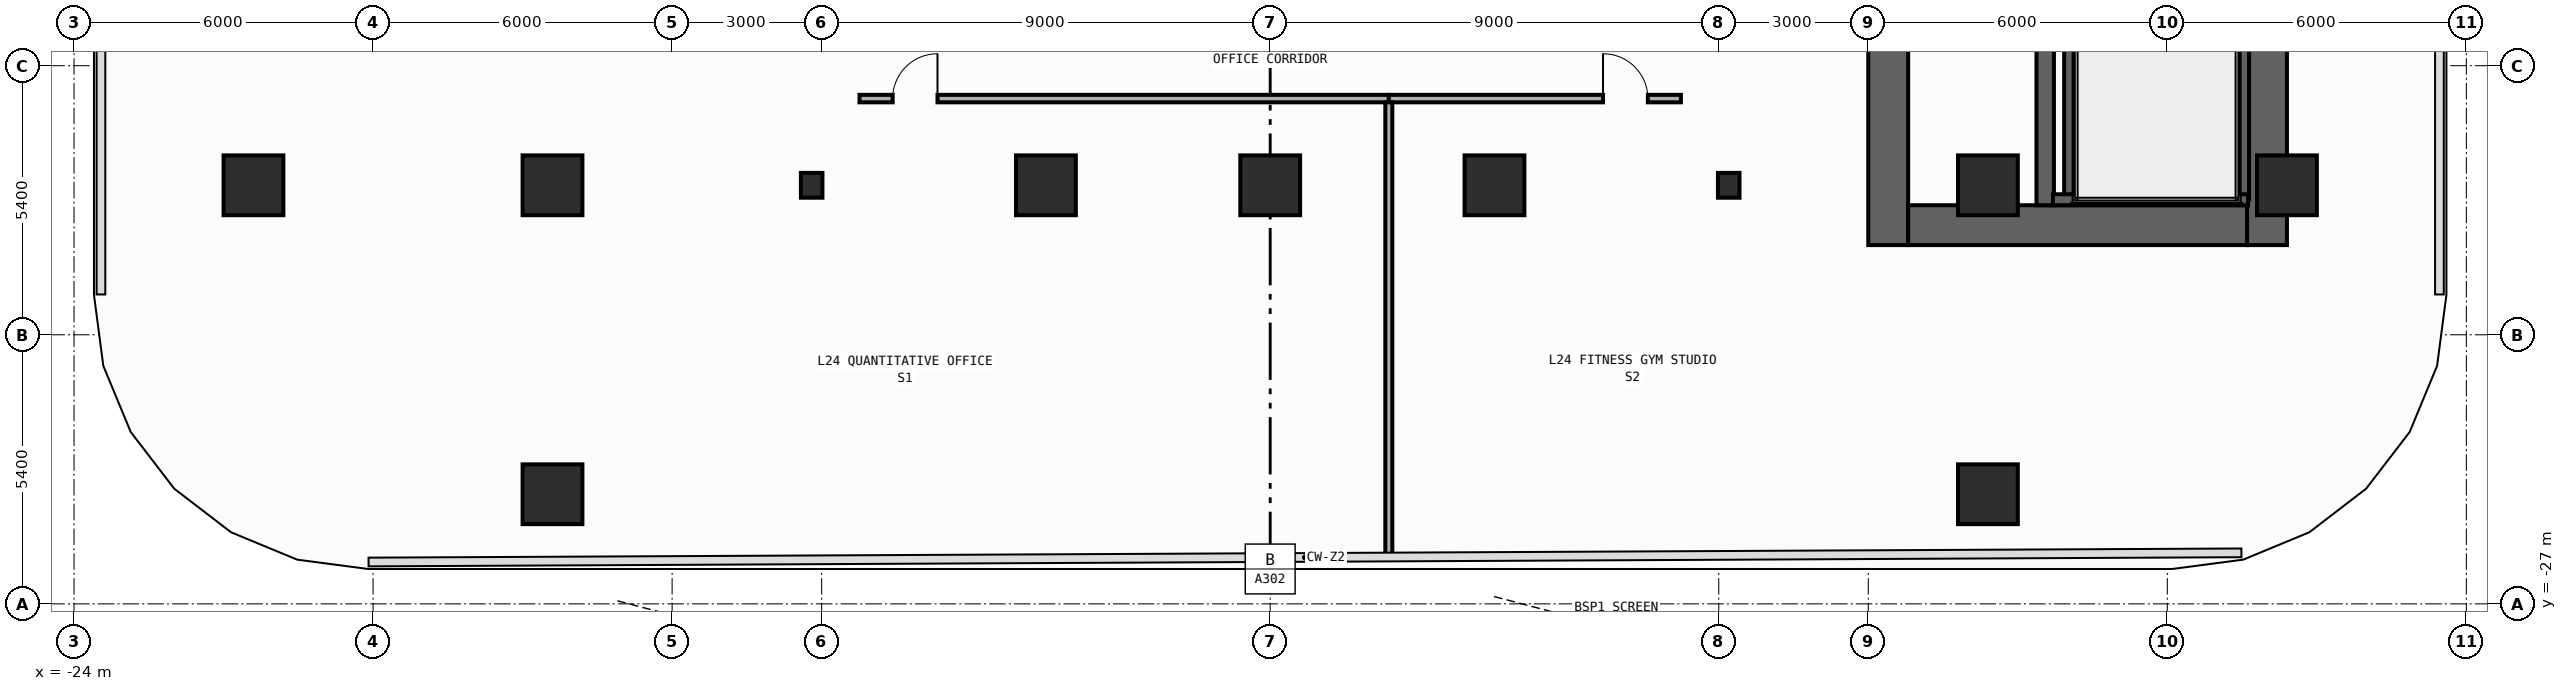
"""IFC4 building model, lengths in metres.
Left out: names, types, materials, properties, quantities, classifications, styles, units other than length and angle.
Written with IfcOpenShell. Run it as: python <this file> out.ifc"""

import sys

from ifc_helpers import new_model, si_unit, direction, frame, frame_2d, origin, origin_2d, place, context, subcontext, project, spatial, rectangle, i_section, extrude, element, fill, save


model = new_model("IFC4")
c1 = context("Model", 3, precision=1e-05, world=origin(), true_north=direction((0.0, 1.0)))
c2 = subcontext(c1, "Body", "Model", "MODEL_VIEW")
j1 = project(units=[si_unit("LENGTHUNIT", "METRE"), si_unit("PLANEANGLEUNIT", "RADIAN")], contexts=[c1])
p1 = place(None, origin())
s1 = spatial("IfcSite", under=j1, at=p1, CompositionType="ELEMENT")
p2 = place(p1, origin())
s2 = spatial("IfcBuilding", under=s1, at=p2, CompositionType="ELEMENT")
p3 = place(p2, frame((0.0, 0.0, 105.8)))
s3 = spatial("IfcBuildingStorey", under=s2, at=p3, CompositionType="ELEMENT", Elevation=105.8)
p4 = place(p3, frame((12.4, -19.8, 0.0), z_axis=(0.0, 0.0, 1.0), x_axis=(0.0, 1.0, 0.0)))
e1 = element("IfcWall", 1, at=p4, inside=s3, PredefinedType="SHEAR", context=c2, shape_type="SweptSolid", body=[
    extrude(rectangle(XDim=27.0, YDim=0.8, at=frame_2d((13.5, 0.0))), origin(), (0.0, 0.0, 1.0), 3.94),
])
p5 = place(p4, frame((23.05, 0.0, 0.0)))
e2 = element("IfcOpeningElement", 2, at=p5, cuts=e1, PredefinedType="OPENING", context=c2, shape_type="SweptSolid", body=[
    extrude(rectangle(XDim=1.1, YDim=2.2, at=frame_2d((0.55, 1.1))), frame((0.0, 0.41, 0.0), z_axis=(0.0, -1.0, 0.0), x_axis=(1.0, 0.0, 0.0)), (0.0, 0.0, 1.0), 0.82),
])
p6 = place(p4, frame((19.85, 0.0, 0.0)))
e3 = element("IfcOpeningElement", 3, at=p6, cuts=e1, PredefinedType="OPENING", context=c2, shape_type="SweptSolid", body=[
    extrude(rectangle(XDim=1.1, YDim=2.2, at=frame_2d((0.55, 1.1))), frame((0.0, 0.41, 0.0), z_axis=(0.0, -1.0, 0.0), x_axis=(1.0, 0.0, 0.0)), (0.0, 0.0, 1.0), 0.82),
])
p7 = place(p4, frame((16.65, 0.0, 0.0)))
e4 = element("IfcOpeningElement", 4, at=p7, cuts=e1, PredefinedType="OPENING", context=c2, shape_type="SweptSolid", body=[
    extrude(rectangle(XDim=1.1, YDim=2.2, at=frame_2d((0.55, 1.1))), frame((0.0, 0.41, 0.0), z_axis=(0.0, -1.0, 0.0), x_axis=(1.0, 0.0, 0.0)), (0.0, 0.0, 1.0), 0.82),
])
p8 = place(p4, frame((7.175, 0.0, 0.0)))
e5 = element("IfcOpeningElement", 5, at=p8, cuts=e1, PredefinedType="OPENING", context=c2, shape_type="SweptSolid", body=[
    extrude(rectangle(XDim=0.85, YDim=2.1, at=frame_2d((0.425, 1.05))), frame((0.0, 0.41, 0.0), z_axis=(0.0, -1.0, 0.0), x_axis=(1.0, 0.0, 0.0)), (0.0, 0.0, 1.0), 0.82),
])
p9 = place(p4, frame((10.375, 0.0, 0.0)))
e6 = element("IfcOpeningElement", 6, at=p9, cuts=e1, PredefinedType="OPENING", context=c2, shape_type="SweptSolid", body=[
    extrude(rectangle(XDim=0.85, YDim=2.1, at=frame_2d((0.425, 1.05))), frame((0.0, 0.41, 0.0), z_axis=(0.0, -1.0, 0.0), x_axis=(1.0, 0.0, 0.0)), (0.0, 0.0, 1.0), 0.82),
])
p10 = place(p4, frame((12.725, 0.0, 0.0)))
e7 = element("IfcOpeningElement", 7, at=p10, cuts=e1, PredefinedType="OPENING", context=c2, shape_type="SweptSolid", body=[
    extrude(rectangle(XDim=1.15, YDim=2.2, at=frame_2d((0.575, 1.1))), frame((0.0, 0.41, 0.0), z_axis=(0.0, -1.0, 0.0), x_axis=(1.0, 0.0, 0.0)), (0.0, 0.0, 1.0), 0.82),
])
p11 = place(p4, frame((25.125, 0.0, 0.0)))
e8 = element("IfcOpeningElement", 8, at=p11, cuts=e1, PredefinedType="OPENING", context=c2, shape_type="SweptSolid", body=[
    extrude(rectangle(XDim=0.85, YDim=2.1, at=frame_2d((0.425, 1.05))), frame((0.0, 0.41, 0.0), z_axis=(0.0, -1.0, 0.0), x_axis=(1.0, 0.0, 0.0)), (0.0, 0.0, 1.0), 0.82),
])
p12 = place(p3, frame((20.0, -19.8, 0.0), z_axis=(0.0, 0.0, 1.0), x_axis=(0.0, 1.0, 0.0)))
e9 = element("IfcWall", 9, at=p12, inside=s3, PredefinedType="SHEAR", context=c2, shape_type="SweptSolid", body=[
    extrude(rectangle(XDim=27.0, YDim=0.8, at=frame_2d((13.5, 0.0))), origin(), (0.0, 0.0, 1.0), 3.94),
])
p13 = place(p3, frame((12.8, -19.4, 0.0), z_axis=(0.0, 0.0, 1.0), x_axis=(1.0, 0.0, 0.0)))
e10 = element("IfcWall", 10, at=p13, inside=s3, PredefinedType="SHEAR", context=c2, shape_type="SweptSolid", body=[
    extrude(rectangle(XDim=6.8, YDim=0.8, at=frame_2d((3.4, 0.0))), origin(), (0.0, 0.0, 1.0), 3.94),
])
p14 = place(p3, frame((15.55, -19.0, 0.0), z_axis=(0.0, 0.0, 1.0), x_axis=(0.0, 1.0, 0.0)))
e11 = element("IfcWall", 11, at=p14, inside=s3, PredefinedType="SHEAR", context=c2, shape_type="SweptSolid", body=[
    extrude(rectangle(XDim=25.4, YDim=0.35, at=frame_2d((12.7, 0.0))), origin(), (0.0, 0.0, 1.0), 3.94),
])
p15 = place(p14, frame((11.925, 0.0, 0.0)))
e12 = element("IfcOpeningElement", 12, at=p15, cuts=e11, PredefinedType="OPENING", context=c2, shape_type="SweptSolid", body=[
    extrude(rectangle(XDim=1.15, YDim=2.2, at=frame_2d((0.575, 1.1))), frame((0.0, 0.185, 0.0), z_axis=(0.0, -1.0, 0.0), x_axis=(1.0, 0.0, 0.0)), (0.0, 0.0, 1.0), 0.37),
])
p16 = place(p14, frame((24.325, 0.0, 0.0)))
e13 = element("IfcOpeningElement", 13, at=p16, cuts=e11, PredefinedType="OPENING", context=c2, shape_type="SweptSolid", body=[
    extrude(rectangle(XDim=0.85, YDim=2.1, at=frame_2d((0.425, 1.05))), frame((0.0, 0.185, 0.0), z_axis=(0.0, -1.0, 0.0), x_axis=(1.0, 0.0, 0.0)), (0.0, 0.0, 1.0), 0.37),
])
for number, where, z_axis, x_axis in (
    (14, (16.04, -18.89, 0.0), (0.0, 0.0, 1.0), (0.0, 1.0, 0.0)),
    (15, (19.53, -18.89, 0.0), (0.0, 0.0, 1.0), (0.0, 1.0, 0.0)),
):
    element("IfcWall", number, at=place(p3, frame(where, z_axis=z_axis, x_axis=x_axis)), inside=s3, PredefinedType="SHEAR", context=c2, shape_type="SweptSolid", body=[
        extrude(rectangle(XDim=11.3, YDim=0.22, at=frame_2d((5.65, 0.0))), origin(), (0.0, 0.0, 1.0), 3.94),
    ])
p17 = place(p3, frame((15.705, -18.89, 0.0), z_axis=(0.0, 0.0, 1.0), x_axis=(1.0, 0.0, 0.0)))
e16 = element("IfcWall", 16, at=p17, inside=s3, PredefinedType="SHEAR", context=c2, shape_type="SweptSolid", body=[
    extrude(rectangle(XDim=3.915, YDim=0.22, at=frame_2d((1.958, 0.0))), origin(), (0.0, 0.0, 1.0), 3.94),
])
for number, where, z_axis, x_axis in (
    (17, (-9.2, -18.6, 0.0), (0.0, 0.0, 1.0), (1.0, 0.0, 0.0)),
    (18, (9.2, -18.6, 0.0), (0.0, 0.0, 1.0), (1.0, 0.0, 0.0)),
):
    element("IfcColumn", number, at=place(p3, frame(where, z_axis=z_axis, x_axis=x_axis)), inside=s3, PredefinedType="COLUMN", context=c2, shape_type="SweptSolid", body=[
        extrude(i_section(OverallWidth=0.432, OverallDepth=0.498, WebThickness=0.045, FlangeThickness=0.07, FilletRadius=0.022, at=origin_2d()), origin(), (0.0, 0.0, 1.0), 4.2),
    ])
for number, where, z_axis, x_axis in (
    (19, (-20.4, -18.6, 0.0), (0.0, 0.0, 1.0), (1.0, 0.0, 0.0)),
    (20, (20.4, -18.6, 0.0), (0.0, 0.0, 1.0), (1.0, 0.0, 0.0)),
    (21, (-14.4, -18.6, 0.0), (0.0, 0.0, 1.0), (1.0, 0.0, 0.0)),
    (22, (14.4, -18.6, 0.0), (0.0, 0.0, 1.0), (1.0, 0.0, 0.0)),
    (23, (-4.5, -18.6, 0.0), (0.0, 0.0, 1.0), (1.0, 0.0, 0.0)),
    (24, (0.0, -18.6, 0.0), (0.0, 0.0, 1.0), (1.0, 0.0, 0.0)),
    (25, (4.5, -18.6, 0.0), (0.0, 0.0, 1.0), (1.0, 0.0, 0.0)),
    (26, (-14.4, -24.8, 0.0), (0.0, 0.0, 1.0), (1.0, 0.0, 0.0)),
    (27, (14.4, -24.8, 0.0), (0.0, 0.0, 1.0), (1.0, 0.0, 0.0)),
):
    element("IfcColumn", number, at=place(p3, frame(where, z_axis=z_axis, x_axis=x_axis)), inside=s3, PredefinedType="COLUMN", context=c2, shape_type="SweptSolid", body=[
        extrude(rectangle(XDim=1.2, YDim=1.2, at=origin_2d()), origin(), (0.0, 0.0, 1.0), 4.2),
    ])
p18 = place(p3, frame((-8.24, -16.86, 0.0), z_axis=(0.0, 0.0, 1.0), x_axis=(1.0, 0.0, 0.0)))
e28 = element("IfcWall", 28, at=p18, inside=s3, PredefinedType="PARTITIONING", context=c2, shape_type="SweptSolid", body=[
    extrude(rectangle(XDim=10.62, YDim=0.15, at=frame_2d((5.31, 0.0))), origin(), (0.0, 0.0, 1.0), 3.94),
])
p19 = place(p18, frame((0.665, 0.0, 0.0)))
e29 = element("IfcOpeningElement", 29, at=p19, cuts=e28, PredefinedType="OPENING", context=c2, shape_type="SweptSolid", body=[
    extrude(rectangle(XDim=0.9, YDim=2.15, at=frame_2d((0.45, 1.075))), frame((0.0, 0.085, 0.0), z_axis=(0.0, -1.0, 0.0), x_axis=(1.0, 0.0, 0.0)), (0.0, 0.0, 1.0), 0.17),
])
p20 = place(p3, frame((2.38, -16.86, 0.0), z_axis=(0.0, 0.0, 1.0), x_axis=(1.0, 0.0, 0.0)))
e30 = element("IfcWall", 30, at=p20, inside=s3, PredefinedType="PARTITIONING", context=c2, shape_type="SweptSolid", body=[
    extrude(rectangle(XDim=5.86, YDim=0.15, at=frame_2d((2.93, 0.0))), origin(), (0.0, 0.0, 1.0), 3.94),
])
p21 = place(p20, frame((4.298, 0.0, 0.0)))
e31 = element("IfcOpeningElement", 31, at=p21, cuts=e30, PredefinedType="OPENING", context=c2, shape_type="SweptSolid", body=[
    extrude(rectangle(XDim=0.9, YDim=2.15, at=frame_2d((0.45, 1.075))), frame((0.0, 0.085, 0.0), z_axis=(0.0, -1.0, 0.0), x_axis=(1.0, 0.0, 0.0)), (0.0, 0.0, 1.0), 0.17),
])
p22 = place(p3, frame((2.38, -26.055, 0.0), z_axis=(0.0, 0.0, 1.0), x_axis=(0.0, 1.0, 0.0)))
e32 = element("IfcWall", 32, at=p22, inside=s3, PredefinedType="PARTITIONING", context=c2, shape_type="SweptSolid", body=[
    extrude(rectangle(XDim=9.12, YDim=0.14, at=frame_2d((4.56, 0.0))), origin(), (0.0, 0.0, 1.0), 3.94),
])
p23 = place(p19, origin())
e33 = element("IfcDoor", 33, at=p23, inside=s3, OperationType="SINGLE_SWING_RIGHT", PredefinedType="DOOR", context=c2, shape_type="SweptSolid", body=[
    extrude(rectangle(XDim=0.9, YDim=2.15, at=frame_2d((0.45, 1.075))), frame((0.0, 0.025, 0.0), z_axis=(0.0, -1.0, 0.0), x_axis=(1.0, 0.0, 0.0)), (0.0, 0.0, 1.0), 0.05),
])
fill(e29, e33)
p24 = place(p21, origin())
e34 = element("IfcDoor", 34, at=p24, inside=s3, OperationType="SINGLE_SWING_LEFT", PredefinedType="DOOR", context=c2, shape_type="SweptSolid", body=[
    extrude(rectangle(XDim=0.9, YDim=2.15, at=frame_2d((0.45, 1.075))), frame((0.0, 0.025, 0.0), z_axis=(0.0, -1.0, 0.0), x_axis=(1.0, 0.0, 0.0)), (0.0, 0.0, 1.0), 0.05),
])
fill(e31, e34)
save(model, sys.argv[1])
